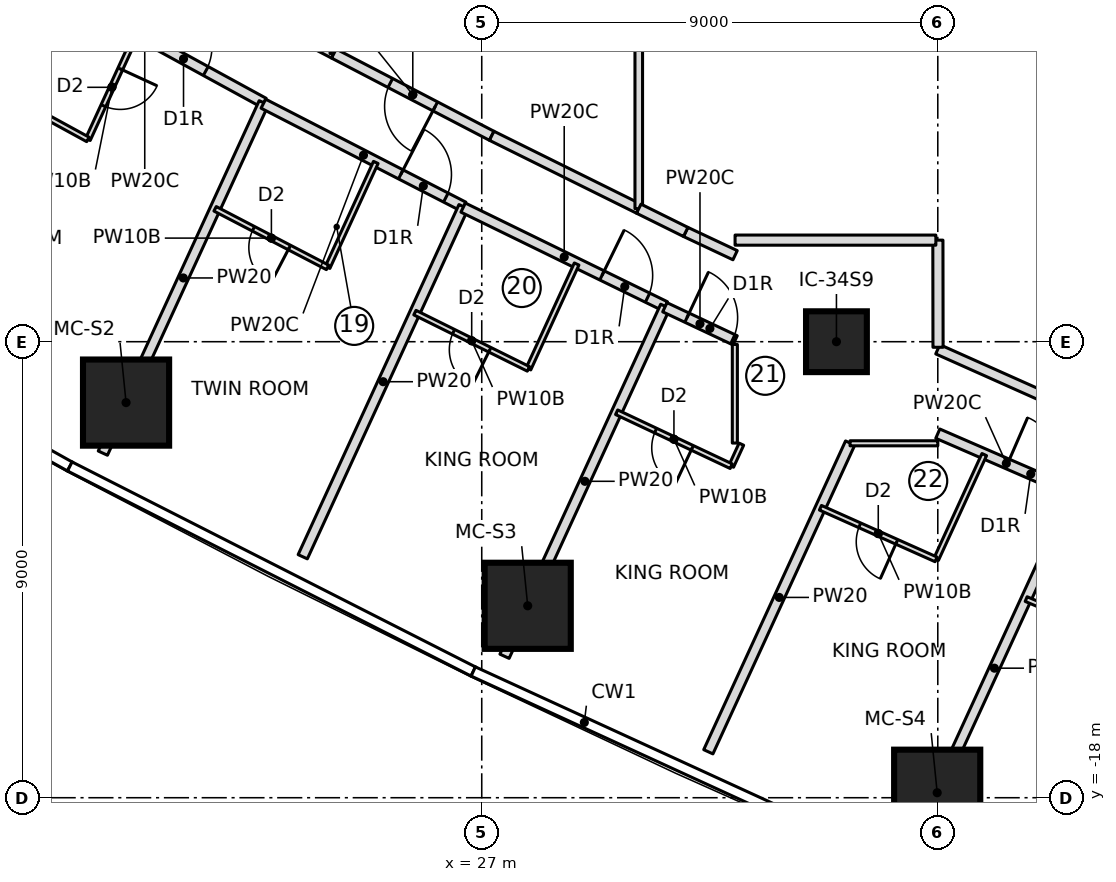
"""IFC4 building model, lengths in metres.
Left out: names, types, materials, properties, quantities, classifications, styles, units other than length and angle.
Written with IfcOpenShell. Run it as: python <this file> out.ifc"""

import sys

from ifc_helpers import new_model, si_unit, direction, frame, frame_2d, origin, origin_2d, place, context, subcontext, project, spatial, rectangle, extrude, element, fill, save


model = new_model("IFC4")
c1 = context("Model", 3, precision=1e-05, world=origin(), true_north=direction((0.0, 1.0)))
c2 = subcontext(c1, "Body", "Model", "MODEL_VIEW")
j1 = project(units=[si_unit("LENGTHUNIT", "METRE"), si_unit("PLANEANGLEUNIT", "RADIAN")], contexts=[c1])
p1 = place(None, origin())
s1 = spatial("IfcSite", under=j1, at=p1, CompositionType="ELEMENT")
p2 = place(p1, origin())
s2 = spatial("IfcBuilding", under=s1, at=p2, CompositionType="ELEMENT")
p3 = place(p2, frame((0.0, 0.0, 88.45)))
s3 = spatial("IfcBuildingStorey", under=s2, at=p3, CompositionType="ELEMENT", Elevation=88.45)
for number, where, z_axis, x_axis in (
    (1, (19.981, -10.202, 0.0), (0.0, 0.0, 1.0), (1.0, 0.0, 0.0)),
    (2, (27.907, -14.212, 0.0), (0.0, 0.0, 1.0), (1.0, 0.0, 0.0)),
    (3, (35.988, -17.902, 0.0), (0.0, 0.0, 1.0), (1.0, 0.0, 0.0)),
):
    element("IfcColumn", number, at=place(p3, frame(where, z_axis=z_axis, x_axis=x_axis)), inside=s3, PredefinedType="COLUMN", context=c2, shape_type="SweptSolid", body=[
        extrude(rectangle(XDim=1.7, YDim=1.7, at=origin_2d()), origin(), (0.0, 0.0, 1.0), 3.55),
    ])
p4 = place(p3, frame((34.0, -9.0, 0.0), z_axis=(0.0, 0.0, 1.0), x_axis=(1.0, 0.0, 0.0)))
e4 = element("IfcColumn", 4, at=p4, inside=s3, PredefinedType="COLUMN", context=c2, shape_type="SweptSolid", body=[
    extrude(rectangle(XDim=1.2, YDim=1.2, at=origin_2d()), origin(), (0.0, 0.0, 1.0), 3.55),
])
p5 = place(p3, frame((18.0, -1.715, 0.0), z_axis=(0.0, 0.0, 1.0), x_axis=(0.877354946945, -0.479841950096, 0.0)))
e5 = element("IfcWall", 5, at=p5, inside=s3, PredefinedType="PARTITIONING", context=c2, shape_type="SweptSolid", body=[
    extrude(rectangle(XDim=5.355, YDim=0.2, at=frame_2d((2.678, 0.0))), origin(), (0.0, 0.0, 1.0), 3.25),
])
p6 = place(p5, frame((3.05, 0.0, 0.0)))
e6 = element("IfcOpeningElement", 6, at=p6, cuts=e5, PredefinedType="OPENING", context=c2, shape_type="SweptSolid", body=[
    extrude(rectangle(XDim=1.0, YDim=2.1, at=frame_2d((0.5, 1.05))), frame((0.0, 0.11, 0.0), z_axis=(0.0, -1.0, 0.0), x_axis=(1.0, 0.0, 0.0)), (0.0, 0.0, 1.0), 0.22),
])
p7 = place(p3, frame((20.18, -2.934, 0.0), z_axis=(0.0, 0.0, 1.0), x_axis=(-0.417450047292, -0.908699872354, 0.0)))
e7 = element("IfcWall", 7, at=p7, inside=s3, PredefinedType="PARTITIONING", context=c2, shape_type="SweptSolid", body=[
    extrude(rectangle(XDim=2.283, YDim=0.1, at=frame_2d((1.141, 0.0))), origin(), (0.0, 0.0, 1.0), 3.25),
])
p8 = place(p7, frame((0.75, 0.0, 0.0)))
e8 = element("IfcOpeningElement", 8, at=p8, cuts=e7, PredefinedType="OPENING", context=c2, shape_type="SweptSolid", body=[
    extrude(rectangle(XDim=0.8, YDim=2.1, at=frame_2d((0.4, 1.05))), frame((0.0, 0.06, 0.0), z_axis=(0.0, -1.0, 0.0), x_axis=(1.0, 0.0, 0.0)), (0.0, 0.0, 1.0), 0.12),
])
p9 = place(p3, frame((19.228, -5.008, 0.0), z_axis=(0.0, 0.0, 1.0), x_axis=(-0.877424481957, 0.479714788663, 0.0)))
e9 = element("IfcWall", 9, at=p9, inside=s3, PredefinedType="PARTITIONING", context=c2, shape_type="SweptSolid", body=[
    extrude(rectangle(XDim=1.625, YDim=0.1, at=frame_2d((0.813, 0.0))), origin(), (0.0, 0.0, 1.0), 3.25),
])
p10 = place(p3, frame((19.522, -11.199, 0.0), z_axis=(0.0, 0.0, 1.0), x_axis=(0.417413534969, 0.908716644959, 0.0)))
e10 = element("IfcWall", 10, at=p10, inside=s3, PredefinedType="PARTITIONING", context=c2, shape_type="SweptSolid", body=[
    extrude(rectangle(XDim=7.609, YDim=0.2, at=frame_2d((3.805, 0.0))), origin(), (0.0, 0.0, 1.0), 3.25),
])
p11 = place(p3, frame((22.69, -4.302, 0.0), z_axis=(0.0, 0.0, 1.0), x_axis=(0.889236075961, -0.457448577667, 0.0)))
e11 = element("IfcWall", 11, at=p11, inside=s3, PredefinedType="PARTITIONING", context=c2, shape_type="SweptSolid", body=[
    extrude(rectangle(XDim=4.443, YDim=0.2, at=frame_2d((2.222, 0.0))), origin(), (0.0, 0.0, 1.0), 3.25),
])
p12 = place(p11, frame((3.05, 0.0, 0.0)))
e12 = element("IfcOpeningElement", 12, at=p12, cuts=e11, PredefinedType="OPENING", context=c2, shape_type="SweptSolid", body=[
    extrude(rectangle(XDim=1.0, YDim=2.1, at=frame_2d((0.5, 1.05))), frame((0.0, 0.11, 0.0), z_axis=(0.0, -1.0, 0.0), x_axis=(1.0, 0.0, 0.0)), (0.0, 0.0, 1.0), 0.22),
])
p13 = place(p3, frame((24.909, -5.462, 0.0), z_axis=(0.0, 0.0, 1.0), x_axis=(-0.417454762401, -0.908697706253, 0.0)))
e13 = element("IfcWall", 13, at=p13, inside=s3, PredefinedType="PARTITIONING", context=c2, shape_type="SweptSolid", body=[
    extrude(rectangle(XDim=2.28, YDim=0.1, at=frame_2d((1.14, 0.0))), origin(), (0.0, 0.0, 1.0), 3.25),
])
p14 = place(p3, frame((23.958, -7.533, 0.0), z_axis=(0.0, 0.0, 1.0), x_axis=(-0.886911586599, 0.461939214135, 0.0)))
e14 = element("IfcWall", 14, at=p14, inside=s3, PredefinedType="PARTITIONING", context=c2, shape_type="SweptSolid", body=[
    extrude(rectangle(XDim=2.503, YDim=0.1, at=frame_2d((1.251, 0.0))), origin(), (0.0, 0.0, 1.0), 3.25),
])
p15 = place(p14, frame((0.85, 0.0, 0.0)))
e15 = element("IfcOpeningElement", 15, at=p15, cuts=e14, PredefinedType="OPENING", context=c2, shape_type="SweptSolid", body=[
    extrude(rectangle(XDim=0.8, YDim=2.1, at=frame_2d((0.4, 1.05))), frame((0.0, 0.06, 0.0), z_axis=(0.0, -1.0, 0.0), x_axis=(1.0, 0.0, 0.0)), (0.0, 0.0, 1.0), 0.12),
])
p16 = place(p3, frame((23.467, -13.244, 0.0), z_axis=(0.0, 0.0, 1.0), x_axis=(0.417455028008, 0.908697584233, 0.0)))
e16 = element("IfcWall", 16, at=p16, inside=s3, PredefinedType="PARTITIONING", context=c2, shape_type="SweptSolid", body=[
    extrude(rectangle(XDim=7.603, YDim=0.2, at=frame_2d((3.802, 0.0))), origin(), (0.0, 0.0, 1.0), 3.25),
])
p17 = place(p3, frame((26.633, -6.353, 0.0), z_axis=(0.0, 0.0, 1.0), x_axis=(0.898502457097, -0.438968489291, 0.0)))
e17 = element("IfcWall", 17, at=p17, inside=s3, PredefinedType="PARTITIONING", context=c2, shape_type="SweptSolid", body=[
    extrude(rectangle(XDim=4.44, YDim=0.2, at=frame_2d((2.22, 0.0))), origin(), (0.0, 0.0, 1.0), 3.25),
])
p18 = place(p17, frame((3.05, 0.0, 0.0)))
e18 = element("IfcOpeningElement", 18, at=p18, cuts=e17, PredefinedType="OPENING", context=c2, shape_type="SweptSolid", body=[
    extrude(rectangle(XDim=1.0, YDim=2.1, at=frame_2d((0.5, 1.05))), frame((0.0, 0.11, 0.0), z_axis=(0.0, -1.0, 0.0), x_axis=(1.0, 0.0, 0.0)), (0.0, 0.0, 1.0), 0.22),
])
p19 = place(p3, frame((28.873, -7.467, 0.0), z_axis=(0.0, 0.0, 1.0), x_axis=(-0.417433204355, -0.908707609686, 0.0)))
e19 = element("IfcWall", 19, at=p19, inside=s3, PredefinedType="PARTITIONING", context=c2, shape_type="SweptSolid", body=[
    extrude(rectangle(XDim=2.278, YDim=0.1, at=frame_2d((1.139, 0.0))), origin(), (0.0, 0.0, 1.0), 3.25),
])
p20 = place(p3, frame((27.922, -9.537, 0.0), z_axis=(0.0, 0.0, 1.0), x_axis=(-0.895944857815, 0.444165297784, 0.0)))
e20 = element("IfcWall", 20, at=p20, inside=s3, PredefinedType="PARTITIONING", context=c2, shape_type="SweptSolid", body=[
    extrude(rectangle(XDim=2.501, YDim=0.1, at=frame_2d((1.25, 0.0))), origin(), (0.0, 0.0, 1.0), 3.25),
])
p21 = place(p20, frame((0.85, 0.0, 0.0)))
e21 = element("IfcOpeningElement", 21, at=p21, cuts=e20, PredefinedType="OPENING", context=c2, shape_type="SweptSolid", body=[
    extrude(rectangle(XDim=0.8, YDim=2.1, at=frame_2d((0.4, 1.05))), frame((0.0, 0.06, 0.0), z_axis=(0.0, -1.0, 0.0), x_axis=(1.0, 0.0, 0.0)), (0.0, 0.0, 1.0), 0.12),
])
p22 = place(p3, frame((27.449, -15.208, 0.0), z_axis=(0.0, 0.0, 1.0), x_axis=(0.417429919618, 0.90870911859, 0.0)))
e22 = element("IfcWall", 22, at=p22, inside=s3, PredefinedType="PARTITIONING", context=c2, shape_type="SweptSolid", body=[
    extrude(rectangle(XDim=7.6, YDim=0.2, at=frame_2d((3.8, 0.0))), origin(), (0.0, 0.0, 1.0), 3.25),
])
p23 = place(p3, frame((30.614, -8.32, 0.0), z_axis=(0.0, 0.0, 1.0), x_axis=(0.904695891996, -0.42605791039, 0.0)))
e23 = element("IfcWall", 23, at=p23, inside=s3, PredefinedType="PARTITIONING", context=c2, shape_type="SweptSolid", body=[
    extrude(rectangle(XDim=1.532, YDim=0.2, at=frame_2d((0.766, 0.0))), origin(), (0.0, 0.0, 1.0), 3.25),
])
p24 = place(p23, frame((0.482, 0.0, 0.0)))
e24 = element("IfcOpeningElement", 24, at=p24, cuts=e23, PredefinedType="OPENING", context=c2, shape_type="SweptSolid", body=[
    extrude(rectangle(XDim=1.0, YDim=2.1, at=frame_2d((0.5, 1.05))), frame((0.0, 0.11, 0.0), z_axis=(0.0, -1.0, 0.0), x_axis=(1.0, 0.0, 0.0)), (0.0, 0.0, 1.0), 0.22),
])
p25 = place(p3, frame((32.124, -11.022, 0.0), z_axis=(0.0, 0.0, 1.0), x_axis=(-0.4176025781, -0.908629785316, 0.0)))
e25 = element("IfcWall", 25, at=p25, inside=s3, PredefinedType="PARTITIONING", context=c2, shape_type="SweptSolid", body=[
    extrude(rectangle(XDim=0.479, YDim=0.1, at=frame_2d((0.239, 0.0))), origin(), (0.0, 0.0, 1.0), 3.25),
])
p26 = place(p3, frame((31.924, -11.457, 0.0), z_axis=(0.0, 0.0, 1.0), x_axis=(-0.904688082375, 0.426074493027, 0.0)))
e26 = element("IfcWall", 26, at=p26, inside=s3, PredefinedType="PARTITIONING", context=c2, shape_type="SweptSolid", body=[
    extrude(rectangle(XDim=2.5, YDim=0.1, at=frame_2d((1.25, 0.0))), origin(), (0.0, 0.0, 1.0), 3.25),
])
p27 = place(p26, frame((0.85, 0.0, 0.0)))
e27 = element("IfcOpeningElement", 27, at=p27, cuts=e26, PredefinedType="OPENING", context=c2, shape_type="SweptSolid", body=[
    extrude(rectangle(XDim=0.8, YDim=2.1, at=frame_2d((0.4, 1.05))), frame((0.0, 0.06, 0.0), z_axis=(0.0, -1.0, 0.0), x_axis=(1.0, 0.0, 0.0)), (0.0, 0.0, 1.0), 0.12),
])
p28 = place(p3, frame((31.471, -17.094, 0.0), z_axis=(0.0, 0.0, 1.0), x_axis=(0.417420546123, 0.908713424394, 0.0)))
e28 = element("IfcWall", 28, at=p28, inside=s3, PredefinedType="PARTITIONING", context=c2, shape_type="SweptSolid", body=[
    extrude(rectangle(XDim=6.706, YDim=0.2, at=frame_2d((3.353, 0.0))), origin(), (0.0, 0.0, 1.0), 3.25),
])
p29 = place(p3, frame((36.0, -10.815, 0.0), z_axis=(0.0, 0.0, 1.0), x_axis=(0.917314766234, -0.398162805457, 0.0)))
e29 = element("IfcWall", 29, at=p29, inside=s3, PredefinedType="PARTITIONING", context=c2, shape_type="SweptSolid", body=[
    extrude(rectangle(XDim=2.948, YDim=0.2, at=frame_2d((1.474, 0.0))), origin(), (0.0, 0.0, 1.0), 3.25),
])
p30 = place(p29, frame((1.5, 0.0, 0.0)))
e30 = element("IfcOpeningElement", 30, at=p30, cuts=e29, PredefinedType="OPENING", context=c2, shape_type="SweptSolid", body=[
    extrude(rectangle(XDim=1.0, YDim=2.1, at=frame_2d((0.5, 1.05))), frame((0.0, 0.11, 0.0), z_axis=(0.0, -1.0, 0.0), x_axis=(1.0, 0.0, 0.0)), (0.0, 0.0, 1.0), 0.22),
])
p31 = place(p3, frame((36.917, -11.228, 0.0), z_axis=(0.0, 0.0, 1.0), x_axis=(-0.417378147321, -0.908732899228, 0.0)))
e31 = element("IfcWall", 31, at=p31, inside=s3, PredefinedType="PARTITIONING", context=c2, shape_type="SweptSolid", body=[
    extrude(rectangle(XDim=2.277, YDim=0.1, at=frame_2d((1.139, 0.0))), origin(), (0.0, 0.0, 1.0), 3.25),
])
p32 = place(p3, frame((35.967, -13.297, 0.0), z_axis=(0.0, 0.0, 1.0), x_axis=(-0.913016449487, 0.407922741417, 0.0)))
e32 = element("IfcWall", 32, at=p32, inside=s3, PredefinedType="PARTITIONING", context=c2, shape_type="SweptSolid", body=[
    extrude(rectangle(XDim=2.5, YDim=0.1, at=frame_2d((1.25, 0.0))), origin(), (0.0, 0.0, 1.0), 3.25),
])
p33 = place(p32, frame((0.85, 0.0, 0.0)))
e33 = element("IfcOpeningElement", 33, at=p33, cuts=e32, PredefinedType="OPENING", context=c2, shape_type="SweptSolid", body=[
    extrude(rectangle(XDim=0.8, YDim=2.1, at=frame_2d((0.4, 1.05))), frame((0.0, 0.06, 0.0), z_axis=(0.0, -1.0, 0.0), x_axis=(1.0, 0.0, 0.0)), (0.0, 0.0, 1.0), 0.12),
])
p34 = place(p3, frame((35.531, -18.898, 0.0), z_axis=(0.0, 0.0, 1.0), x_axis=(0.417416334044, 0.908715359215, 0.0)))
e34 = element("IfcWall", 34, at=p34, inside=s3, PredefinedType="PARTITIONING", context=c2, shape_type="SweptSolid", body=[
    extrude(rectangle(XDim=7.604, YDim=0.2, at=frame_2d((3.802, 0.0))), origin(), (0.0, 0.0, 1.0), 3.25),
])
p35 = place(p3, frame((40.048, -15.054, 0.0), z_axis=(0.0, 0.0, 1.0), x_axis=(-0.921042675983, 0.38946166566, 0.0)))
e35 = element("IfcWall", 35, at=p35, inside=s3, PredefinedType="PARTITIONING", context=c2, shape_type="SweptSolid", body=[
    extrude(rectangle(XDim=2.501, YDim=0.1, at=frame_2d((1.25, 0.0))), origin(), (0.0, 0.0, 1.0), 3.25),
])
p36 = place(p35, frame((0.85, 0.0, 0.0)))
e36 = element("IfcOpeningElement", 36, at=p36, cuts=e35, PredefinedType="OPENING", context=c2, shape_type="SweptSolid", body=[
    extrude(rectangle(XDim=0.8, YDim=2.1, at=frame_2d((0.4, 1.05))), frame((0.0, 0.06, 0.0), z_axis=(0.0, -1.0, 0.0), x_axis=(1.0, 0.0, 0.0)), (0.0, 0.0, 1.0), 0.12),
])
p37 = place(p3, frame((24.082, -3.313, 0.0), z_axis=(0.0, 0.0, 1.0), x_axis=(-0.886927773157, 0.461908135026, 0.0)))
e37 = element("IfcWall", 37, at=p37, inside=s3, PredefinedType="PARTITIONING", context=c2, shape_type="SweptSolid", body=[
    extrude(rectangle(XDim=0.761, YDim=0.2, at=frame_2d((0.381, 0.0))), origin(), (0.0, 0.0, 1.0), 3.25),
])
p38 = place(p3, frame((24.082, -3.313, 0.0), z_axis=(0.0, 0.0, 1.0), x_axis=(0.0, 1.0, 0.0)))
e38 = element("IfcWall", 38, at=p38, inside=s3, PredefinedType="PARTITIONING", context=c2, shape_type="SweptSolid", body=[
    extrude(rectangle(XDim=6.627, YDim=0.15, at=frame_2d((3.313, 0.0))), origin(), (0.0, 0.0, 1.0), 3.25),
])
p39 = place(p3, frame((27.196, -4.936, 0.0), z_axis=(0.0, 0.0, 1.0), x_axis=(-0.886893314466, 0.461974294476, 0.0)))
e39 = element("IfcWall", 39, at=p39, inside=s3, PredefinedType="PARTITIONING", context=c2, shape_type="SweptSolid", body=[
    extrude(rectangle(XDim=3.512, YDim=0.2, at=frame_2d((1.756, 0.0))), origin(), (0.0, 0.0, 1.0), 3.25),
])
p40 = place(p39, frame((1.256, 0.0, 0.0)))
e40 = element("IfcOpeningElement", 40, at=p40, cuts=e39, PredefinedType="OPENING", context=c2, shape_type="SweptSolid", body=[
    extrude(rectangle(XDim=1.0, YDim=2.1, at=frame_2d((0.5, 1.05))), frame((0.0, 0.11, 0.0), z_axis=(0.0, -1.0, 0.0), x_axis=(1.0, 0.0, 0.0)), (0.0, 0.0, 1.0), 0.22),
])
p41 = place(p3, frame((30.099, -6.375, 0.0), z_axis=(0.0, 0.0, 1.0), x_axis=(-0.895974251126, 0.444106002345, 0.0)))
e41 = element("IfcWall", 41, at=p41, inside=s3, PredefinedType="PARTITIONING", context=c2, shape_type="SweptSolid", body=[
    extrude(rectangle(XDim=3.24, YDim=0.2, at=frame_2d((1.62, 0.0))), origin(), (0.0, 0.0, 1.0), 3.25),
])
p42 = place(p3, frame((30.099, -6.375, 0.0), z_axis=(0.0, 0.0, 1.0), x_axis=(0.0, 1.0, 0.0)))
e42 = element("IfcWall", 42, at=p42, inside=s3, PredefinedType="PARTITIONING", context=c2, shape_type="SweptSolid", body=[
    extrude(rectangle(XDim=12.749, YDim=0.15, at=frame_2d((6.375, 0.0))), origin(), (0.0, 0.0, 1.0), 3.25),
])
p43 = place(p3, frame((38.792, -10.397, 0.0), z_axis=(0.0, 0.0, 1.0), x_axis=(-0.913029587861, 0.407893333716, 0.0)))
e43 = element("IfcWall", 43, at=p43, inside=s3, PredefinedType="PARTITIONING", context=c2, shape_type="SweptSolid", body=[
    extrude(rectangle(XDim=3.058, YDim=0.2, at=frame_2d((1.529, 0.0))), origin(), (0.0, 0.0, 1.0), 3.25),
])
p44 = place(p3, frame((32.0, -7.293, 0.0), z_axis=(0.0, 0.0, 1.0), x_axis=(-0.904690325494, 0.426069730159, 0.0)))
e44 = element("IfcWall", 44, at=p44, inside=s3, PredefinedType="PARTITIONING", context=c2, shape_type="SweptSolid", body=[
    extrude(rectangle(XDim=1.078, YDim=0.2, at=frame_2d((0.539, 0.0))), origin(), (0.0, 0.0, 1.0), 3.25),
])
p45 = place(p3, frame((31.025, -6.833, 0.0), z_axis=(0.0, 0.0, 1.0), x_axis=(-0.89598080504, 0.44409277972, 0.0)))
e45 = element("IfcWall", 45, at=p45, inside=s3, PredefinedType="PARTITIONING", context=c2, shape_type="SweptSolid", body=[
    extrude(rectangle(XDim=1.033, YDim=0.2, at=frame_2d((0.517, 0.0))), origin(), (0.0, 0.0, 1.0), 3.25),
])
p46 = place(p3, frame((31.995, -9.054, 0.0), z_axis=(0.0, 0.0, 1.0), x_axis=(0.0, -1.0, 0.0)))
e46 = element("IfcWall", 46, at=p46, inside=s3, PredefinedType="PARTITIONING", context=c2, shape_type="SweptSolid", body=[
    extrude(rectangle(XDim=1.947, YDim=0.1, at=frame_2d((0.973, 0.0))), origin(), (0.0, 0.0, 1.0), 3.25),
])
p47 = place(p3, frame((34.268, -11.005, 0.0), z_axis=(0.0, 0.0, 1.0), x_axis=(1.0, 0.0, 0.0)))
e47 = element("IfcWall", 47, at=p47, inside=s3, PredefinedType="PARTITIONING", context=c2, shape_type="SweptSolid", body=[
    extrude(rectangle(XDim=1.732, YDim=0.1, at=frame_2d((0.866, 0.0))), origin(), (0.0, 0.0, 1.0), 3.25),
])
p48 = place(p3, frame((36.005, -9.11, 0.0), z_axis=(0.0, 0.0, 1.0), x_axis=(-0.001385360019, 0.999999040388, 0.0)))
e48 = element("IfcWall", 48, at=p48, inside=s3, PredefinedType="PARTITIONING", context=c2, shape_type="SweptSolid", body=[
    extrude(rectangle(XDim=2.115, YDim=0.2, at=frame_2d((1.057, 0.0))), origin(), (0.0, 0.0, 1.0), 3.25),
])
p49 = place(p3, frame((35.962, -6.995, 0.0), z_axis=(0.0, 0.0, 1.0), x_axis=(-0.999999998102, 6.1614294e-05, 0.0)))
e49 = element("IfcWall", 49, at=p49, inside=s3, PredefinedType="PARTITIONING", context=c2, shape_type="SweptSolid", body=[
    extrude(rectangle(XDim=3.962, YDim=0.2, at=frame_2d((1.981, 0.0))), origin(), (0.0, 0.0, 1.0), 3.25),
])
p50 = place(p8, origin())
e50 = element("IfcDoor", 50, at=p50, inside=s3, OperationType="SINGLE_SWING_LEFT", PredefinedType="DOOR", context=c2, shape_type="SweptSolid", body=[
    extrude(rectangle(XDim=0.8, YDim=2.1, at=frame_2d((0.4, 1.05))), frame((0.0, 0.025, 0.0), z_axis=(0.0, -1.0, 0.0), x_axis=(1.0, 0.0, 0.0)), (0.0, 0.0, 1.0), 0.05),
])
fill(e8, e50)
p51 = place(p6, origin())
e51 = element("IfcDoor", 51, at=p51, inside=s3, OperationType="SINGLE_SWING_RIGHT", PredefinedType="DOOR", context=c2, shape_type="SweptSolid", body=[
    extrude(rectangle(XDim=1.0, YDim=2.1, at=frame_2d((0.5, 1.05))), frame((0.0, 0.025, 0.0), z_axis=(0.0, -1.0, 0.0), x_axis=(1.0, 0.0, 0.0)), (0.0, 0.0, 1.0), 0.05),
])
fill(e6, e51)
p52 = place(p15, origin())
e52 = element("IfcDoor", 52, at=p52, inside=s3, OperationType="SINGLE_SWING_LEFT", PredefinedType="DOOR", context=c2, shape_type="SweptSolid", body=[
    extrude(rectangle(XDim=0.8, YDim=2.1, at=frame_2d((0.4, 1.05))), frame((0.0, 0.025, 0.0), z_axis=(0.0, -1.0, 0.0), x_axis=(1.0, 0.0, 0.0)), (0.0, 0.0, 1.0), 0.05),
])
fill(e15, e52)
p53 = place(p12, origin())
e53 = element("IfcDoor", 53, at=p53, inside=s3, OperationType="SINGLE_SWING_RIGHT", PredefinedType="DOOR", context=c2, shape_type="SweptSolid", body=[
    extrude(rectangle(XDim=1.0, YDim=2.1, at=frame_2d((0.5, 1.05))), frame((0.0, 0.025, 0.0), z_axis=(0.0, -1.0, 0.0), x_axis=(1.0, 0.0, 0.0)), (0.0, 0.0, 1.0), 0.05),
])
fill(e12, e53)
p54 = place(p21, origin())
e54 = element("IfcDoor", 54, at=p54, inside=s3, OperationType="SINGLE_SWING_LEFT", PredefinedType="DOOR", context=c2, shape_type="SweptSolid", body=[
    extrude(rectangle(XDim=0.8, YDim=2.1, at=frame_2d((0.4, 1.05))), frame((0.0, 0.025, 0.0), z_axis=(0.0, -1.0, 0.0), x_axis=(1.0, 0.0, 0.0)), (0.0, 0.0, 1.0), 0.05),
])
fill(e21, e54)
p55 = place(p18, origin())
e55 = element("IfcDoor", 55, at=p55, inside=s3, OperationType="SINGLE_SWING_RIGHT", PredefinedType="DOOR", context=c2, shape_type="SweptSolid", body=[
    extrude(rectangle(XDim=1.0, YDim=2.1, at=frame_2d((0.5, 1.05))), frame((0.0, 0.025, 0.0), z_axis=(0.0, -1.0, 0.0), x_axis=(1.0, 0.0, 0.0)), (0.0, 0.0, 1.0), 0.05),
])
fill(e18, e55)
p56 = place(p27, origin())
e56 = element("IfcDoor", 56, at=p56, inside=s3, OperationType="SINGLE_SWING_LEFT", PredefinedType="DOOR", context=c2, shape_type="SweptSolid", body=[
    extrude(rectangle(XDim=0.8, YDim=2.1, at=frame_2d((0.4, 1.05))), frame((0.0, 0.025, 0.0), z_axis=(0.0, -1.0, 0.0), x_axis=(1.0, 0.0, 0.0)), (0.0, 0.0, 1.0), 0.05),
])
fill(e27, e56)
p57 = place(p24, origin())
e57 = element("IfcDoor", 57, at=p57, inside=s3, OperationType="SINGLE_SWING_RIGHT", PredefinedType="DOOR", context=c2, shape_type="SweptSolid", body=[
    extrude(rectangle(XDim=1.0, YDim=2.1, at=frame_2d((0.5, 1.05))), frame((0.0, 0.025, 0.0), z_axis=(0.0, -1.0, 0.0), x_axis=(1.0, 0.0, 0.0)), (0.0, 0.0, 1.0), 0.05),
])
fill(e24, e57)
p58 = place(p33, origin())
e58 = element("IfcDoor", 58, at=p58, inside=s3, OperationType="SINGLE_SWING_LEFT", PredefinedType="DOOR", context=c2, shape_type="SweptSolid", body=[
    extrude(rectangle(XDim=0.8, YDim=2.1, at=frame_2d((0.4, 1.05))), frame((0.0, 0.025, 0.0), z_axis=(0.0, -1.0, 0.0), x_axis=(1.0, 0.0, 0.0)), (0.0, 0.0, 1.0), 0.05),
])
fill(e33, e58)
p59 = place(p30, origin())
e59 = element("IfcDoor", 59, at=p59, inside=s3, OperationType="SINGLE_SWING_RIGHT", PredefinedType="DOOR", context=c2, shape_type="SweptSolid", body=[
    extrude(rectangle(XDim=1.0, YDim=2.1, at=frame_2d((0.5, 1.05))), frame((0.0, 0.025, 0.0), z_axis=(0.0, -1.0, 0.0), x_axis=(1.0, 0.0, 0.0)), (0.0, 0.0, 1.0), 0.05),
])
fill(e30, e59)
p60 = place(p40, origin())
e60 = element("IfcDoor", 60, at=p60, inside=s3, OperationType="SINGLE_SWING_LEFT", PredefinedType="DOOR", context=c2, shape_type="SweptSolid", body=[
    extrude(rectangle(XDim=1.0, YDim=2.1, at=frame_2d((0.5, 1.05))), frame((0.0, 0.025, 0.0), z_axis=(0.0, -1.0, 0.0), x_axis=(1.0, 0.0, 0.0)), (0.0, 0.0, 1.0), 0.05),
])
fill(e40, e60)
save(model, sys.argv[1])
